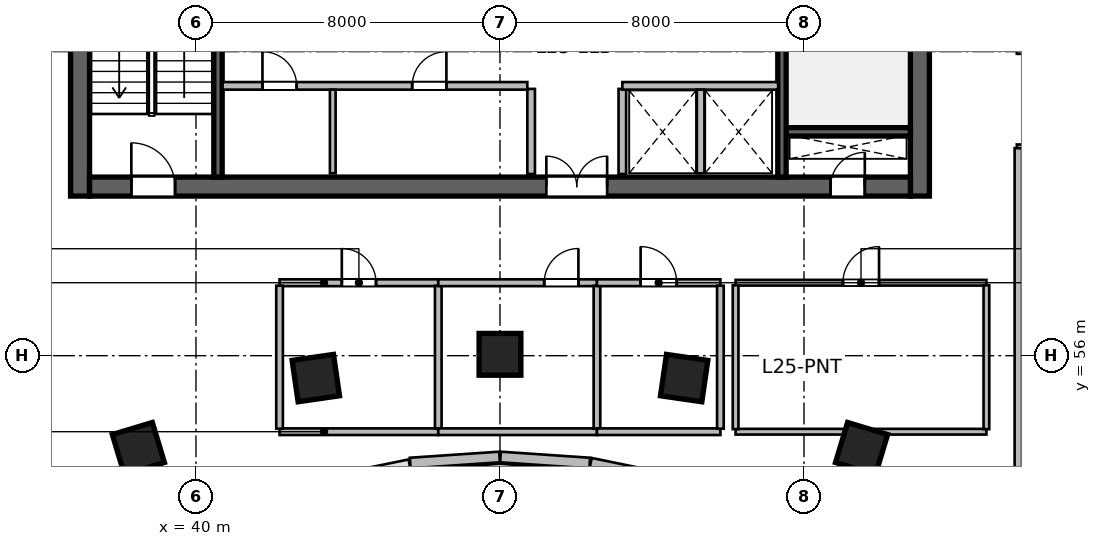
"""IFC4 building model, lengths in metres.
Left out: names, types, materials, properties, quantities, classifications, styles, units other than length and angle.
Written with IfcOpenShell. Run it as: python <this file> out.ifc"""

import sys

from ifc_helpers import new_model, si_unit, direction, frame, frame_2d, origin, origin_2d, place, context, subcontext, project, spatial, rectangle, extrude, source, transform, mapped, element, fill, save


model = new_model("IFC4")
c1 = context("Model", 3, precision=1e-05, world=origin(), true_north=direction((0.0, 1.0)))
c2 = subcontext(c1, "Body", "Model", "MODEL_VIEW")
j1 = project(units=[si_unit("LENGTHUNIT", "METRE"), si_unit("PLANEANGLEUNIT", "RADIAN")], contexts=[c1])
p1 = place(None, origin())
s1 = spatial("IfcSite", under=j1, at=p1, CompositionType="ELEMENT")
p2 = place(p1, origin())
s2 = spatial("IfcBuilding", under=s1, at=p2, CompositionType="ELEMENT")
p3 = place(p2, frame((0.0, 0.0, 107.7)))
s3 = spatial("IfcBuildingStorey", under=s2, at=p3, CompositionType="ELEMENT", Elevation=107.7)
m1 = source(origin(), c2, "Body", "SweptSolid", [
    extrude(rectangle(XDim=12.0, YDim=0.5, at=frame_2d((6.0, 0.0))), origin(), (0.0, 0.0, 1.0), 3.9),
])
for number, where, z_axis, x_axis in (
    (1, (36.95, 60.2, 0.0), (0.0, 0.0, 1.0), (0.0, 1.0, 0.0)),
    (2, (59.05, 60.2, 0.0), (0.0, 0.0, 1.0), (0.0, 1.0, 0.0)),
):
    element("IfcWall", number, at=place(p3, frame(where, z_axis=z_axis, x_axis=x_axis)), inside=s3, PredefinedType="SHEAR", context=c2, shape_type="MappedRepresentation", body=[
        mapped(m1, transform((0.0, 0.0, 0.0), scale=1.0)),
    ])
m2 = source(origin(), c2, "Body", "SweptSolid", [
    extrude(rectangle(XDim=21.6, YDim=0.5, at=frame_2d((10.8, 0.0))), origin(), (0.0, 0.0, 1.0), 3.9),
])
p4 = place(p3, frame((37.2, 60.45, 0.0), z_axis=(0.0, 0.0, 1.0), x_axis=(1.0, 0.0, 0.0)))
e3 = element("IfcWall", 3, at=p4, inside=s3, PredefinedType="SHEAR", context=c2, shape_type="MappedRepresentation", body=[
    mapped(m2, transform((0.0, 0.0, 0.0), scale=1.0)),
])
p5 = place(p4, frame((1.1, 0.0, 0.0)))
e4 = element("IfcOpeningElement", 4, at=p5, cuts=e3, PredefinedType="OPENING", context=c2, shape_type="SweptSolid", body=[
    extrude(rectangle(XDim=1.15, YDim=2.15, at=frame_2d((0.575, 1.075))), frame((0.0, 0.26, 0.0), z_axis=(0.0, -1.0, 0.0), x_axis=(1.0, 0.0, 0.0)), (0.0, 0.0, 1.0), 0.52),
])
p6 = place(p4, frame((19.5, 0.0, 0.0)))
e5 = element("IfcOpeningElement", 5, at=p6, cuts=e3, PredefinedType="OPENING", context=c2, shape_type="SweptSolid", body=[
    extrude(rectangle(XDim=0.9, YDim=2.1, at=frame_2d((0.45, 1.05))), frame((0.0, 0.26, 0.0), z_axis=(0.0, -1.0, 0.0), x_axis=(1.0, 0.0, 0.0)), (0.0, 0.0, 1.0), 0.52),
])
p7 = place(p4, frame((12.02, 0.0, 0.0)))
e6 = element("IfcOpeningElement", 6, at=p7, cuts=e3, PredefinedType="OPENING", context=c2, shape_type="SweptSolid", body=[
    extrude(rectangle(XDim=1.6, YDim=2.15, at=frame_2d((0.8, 1.075))), frame((0.0, 0.26, 0.0), z_axis=(0.0, -1.0, 0.0), x_axis=(1.0, 0.0, 0.0)), (0.0, 0.0, 1.0), 0.52),
])
m3 = source(origin(), c2, "Body", "SweptSolid", [
    extrude(rectangle(XDim=3.27, YDim=0.22, at=frame_2d((1.635, 0.0))), origin(), (0.0, 0.0, 1.0), 3.9),
])
p8 = place(p3, frame((55.53, 61.89, 0.0), z_axis=(0.0, 0.0, 1.0), x_axis=(1.0, 0.0, 0.0)))
e7 = element("IfcWall", 7, at=p8, inside=s3, PredefinedType="SHEAR", context=c2, shape_type="MappedRepresentation", body=[
    mapped(m3, transform((0.0, 0.0, 0.0), scale=1.0)),
])
m4 = source(origin(), c2, "Body", "SweptSolid", [
    extrude(rectangle(XDim=11.0, YDim=0.22, at=frame_2d((5.5, 0.0))), origin(), (0.0, 0.0, 1.0), 3.9),
])
p9 = place(p3, frame((40.58, 60.7, 0.0), z_axis=(0.0, 0.0, 1.0), x_axis=(0.0, 1.0, 0.0)))
e8 = element("IfcWall", 8, at=p9, inside=s3, PredefinedType="SHEAR", context=c2, shape_type="MappedRepresentation", body=[
    mapped(m4, transform((0.0, 0.0, 0.0), scale=1.0)),
])
p10 = place(p3, frame((55.42, 60.7, 0.0), z_axis=(0.0, 0.0, 1.0), x_axis=(0.0, 1.0, 0.0)))
e9 = element("IfcWall", 9, at=p10, inside=s3, PredefinedType="SHEAR", context=c2, shape_type="MappedRepresentation", body=[
    mapped(m4, transform((0.0, 0.0, 0.0), scale=1.0)),
])
p11 = place(p10, frame((9.545, 0.0, 0.0)))
e10 = element("IfcOpeningElement", 10, at=p11, cuts=e9, PredefinedType="OPENING", context=c2, shape_type="SweptSolid", body=[
    extrude(rectangle(XDim=1.15, YDim=2.15, at=frame_2d((0.575, 1.075))), frame((0.0, 0.12, 0.0), z_axis=(0.0, -1.0, 0.0), x_axis=(1.0, 0.0, 0.0)), (0.0, 0.0, 1.0), 0.24),
])
m5 = source(origin(), c2, "Body", "SweptSolid", [
    extrude(rectangle(XDim=1.1, YDim=1.1, at=origin_2d()), origin(), (0.0, 0.0, 1.0), 3.9),
])
for number, where, z_axis, x_axis in (
    (11, (38.485, 53.558, 0.0), (0.0, 0.0, 1.0), (-0.289, 0.957, 0.0)),
    (12, (43.154, 55.411, 0.0), (0.0, 0.0, 1.0), (-0.143, 0.99, 0.0)),
    (13, (48.0, 56.036, 0.0), (0.0, 0.0, 1.0), (0.0, 1.0, 0.0)),
    (14, (52.846, 55.411, 0.0), (0.0, 0.0, 1.0), (0.143, 0.99, 0.0)),
    (15, (57.515, 53.558, 0.0), (0.0, 0.0, 1.0), (0.289, 0.957, 0.0)),
):
    element("IfcColumn", number, at=place(p3, frame(where, z_axis=z_axis, x_axis=x_axis)), inside=s3, PredefinedType="COLUMN", context=c2, shape_type="MappedRepresentation", body=[
        mapped(m5, transform((0.0, 0.0, 0.0), scale=1.0)),
    ])
m6 = source(origin(), c2, "Body", "SweptSolid", [
    extrude(rectangle(XDim=2.374, YDim=0.28, at=frame_2d((1.187, 0.0))), origin(), (0.0, 0.0, 1.0), 3.65),
])
p12 = place(p3, frame((52.711, 52.695, 0.0), z_axis=(0.0, 0.0, 1.0), x_axis=(-0.979619827472, 0.200860632341, 0.0)))
e16 = element("IfcWall", 16, at=p12, inside=s3, PredefinedType="SOLIDWALL", context=c2, shape_type="MappedRepresentation", body=[
    mapped(m6, transform((0.0, 0.0, 0.0), scale=1.0)),
])
m7 = source(origin(), c2, "Body", "SweptSolid", [
    extrude(rectangle(XDim=2.355, YDim=0.28, at=frame_2d((1.177, 0.0))), origin(), (0.0, 0.0, 1.0), 3.65),
])
for number, where, z_axis, x_axis in (
    (17, (50.362, 53.175, 0.0), (0.0, 0.0, 1.0), (-0.998, 0.068, 0.0)),
    (18, (47.988, 53.335, 0.0), (0.0, 0.0, 1.0), (-0.998, -0.068, 0.0)),
):
    element("IfcWall", number, at=place(p3, frame(where, z_axis=z_axis, x_axis=x_axis)), inside=s3, PredefinedType="SOLIDWALL", context=c2, shape_type="MappedRepresentation", body=[
        mapped(m7, transform((0.0, 0.0, 0.0), scale=1.0)),
    ])
m8 = source(origin(), c2, "Body", "SweptSolid", [
    extrude(rectangle(XDim=2.24, YDim=0.2, at=frame_2d((1.12, 0.0))), origin(), (0.0, 0.0, 1.0), 3.65),
])
for number, where, z_axis, x_axis in (
    (19, (48.82, 60.78, 0.0), (0.0, 0.0, 1.0), (0.0, 1.0, 0.0)),
    (20, (51.22, 60.78, 0.0), (0.0, 0.0, 1.0), (0.0, 1.0, 0.0)),
):
    element("IfcWall", number, at=place(p3, frame(where, z_axis=z_axis, x_axis=x_axis)), inside=s3, PredefinedType="SOLIDWALL", context=c2, shape_type="MappedRepresentation", body=[
        mapped(m8, transform((0.0, 0.0, 0.0), scale=1.0)),
    ])
m9 = source(origin(), c2, "Body", "SweptSolid", [
    extrude(rectangle(XDim=8.02, YDim=0.2, at=frame_2d((4.01, 0.0))), origin(), (0.0, 0.0, 1.0), 3.65),
])
p13 = place(p3, frame((40.7, 63.1, 0.0), z_axis=(0.0, 0.0, 1.0), x_axis=(1.0, 0.0, 0.0)))
e21 = element("IfcWall", 21, at=p13, inside=s3, PredefinedType="SOLIDWALL", context=c2, shape_type="MappedRepresentation", body=[
    mapped(m9, transform((0.0, 0.0, 0.0), scale=1.0)),
])
p14 = place(p13, frame((1.05, 0.0, 0.0)))
e22 = element("IfcOpeningElement", 22, at=p14, cuts=e21, PredefinedType="OPENING", context=c2, shape_type="SweptSolid", body=[
    extrude(rectangle(XDim=0.9, YDim=2.1, at=frame_2d((0.45, 1.05))), frame((0.0, 0.11, 0.0), z_axis=(0.0, -1.0, 0.0), x_axis=(1.0, 0.0, 0.0)), (0.0, 0.0, 1.0), 0.22),
])
p15 = place(p13, frame((4.99, 0.0, 0.0)))
e23 = element("IfcOpeningElement", 23, at=p15, cuts=e21, PredefinedType="OPENING", context=c2, shape_type="SweptSolid", body=[
    extrude(rectangle(XDim=0.9, YDim=2.1, at=frame_2d((0.45, 1.05))), frame((0.0, 0.11, 0.0), z_axis=(0.0, -1.0, 0.0), x_axis=(1.0, 0.0, 0.0)), (0.0, 0.0, 1.0), 0.22),
])
m10 = source(origin(), c2, "Body", "SweptSolid", [
    extrude(rectangle(XDim=4.1, YDim=0.2, at=frame_2d((2.05, 0.0))), origin(), (0.0, 0.0, 1.0), 3.65),
])
p16 = place(p3, frame((51.22, 63.1, 0.0), z_axis=(0.0, 0.0, 1.0), x_axis=(1.0, 0.0, 0.0)))
e24 = element("IfcWall", 24, at=p16, inside=s3, PredefinedType="SOLIDWALL", context=c2, shape_type="MappedRepresentation", body=[
    mapped(m10, transform((0.0, 0.0, 0.0), scale=1.0)),
])
m11 = source(origin(), c2, "Body", "SweptSolid", [
    extrude(rectangle(XDim=2.2, YDim=0.15, at=frame_2d((1.1, 0.0))), origin(), (0.0, 0.0, 1.0), 3.65),
])
p17 = place(p3, frame((43.6, 60.8, 0.0), z_axis=(0.0, 0.0, 1.0), x_axis=(0.0, 1.0, 0.0)))
e25 = element("IfcWall", 25, at=p17, inside=s3, PredefinedType="PARTITIONING", context=c2, shape_type="MappedRepresentation", body=[
    mapped(m11, transform((0.0, 0.0, 0.0), scale=1.0)),
])
m12 = source(origin(), c2, "Body", "SweptSolid", [
    extrude(rectangle(XDim=2.2, YDim=0.2, at=frame_2d((1.1, 0.0))), origin(), (0.0, 0.0, 1.0), 3.65),
])
p18 = place(p3, frame((53.28, 60.8, 0.0), z_axis=(0.0, 0.0, 1.0), x_axis=(0.0, 1.0, 0.0)))
e26 = element("IfcWall", 26, at=p18, inside=s3, PredefinedType="SOLIDWALL", context=c2, shape_type="MappedRepresentation", body=[
    mapped(m12, transform((0.0, 0.0, 0.0), scale=1.0)),
])
m13 = source(origin(), c2, "Body", "SweptSolid", [
    extrude(rectangle(XDim=4.176, YDim=0.175, at=frame_2d((2.088, 0.0))), origin(), (0.0, 0.0, 1.0), 3.65),
])
p19 = place(p3, frame((42.2, 54.0, 0.0), z_axis=(0.0, 0.0, 1.0), x_axis=(1.0, 0.0, 0.0)))
e27 = element("IfcWall", 27, at=p19, inside=s3, PredefinedType="PARTITIONING", context=c2, shape_type="MappedRepresentation", body=[
    mapped(m13, transform((0.0, 0.0, 0.0), scale=1.0)),
])
m14 = source(origin(), c2, "Body", "SweptSolid", [
    extrude(rectangle(XDim=4.176, YDim=0.18, at=frame_2d((2.088, 0.0))), origin(), (0.0, 0.0, 1.0), 3.65),
])
p20 = place(p3, frame((42.2, 57.92, 0.0), z_axis=(0.0, 0.0, 1.0), x_axis=(1.0, 0.0, 0.0)))
e28 = element("IfcWall", 28, at=p20, inside=s3, PredefinedType="PLUMBINGWALL", context=c2, shape_type="MappedRepresentation", body=[
    mapped(m14, transform((0.0, 0.0, 0.0), scale=1.0)),
])
p21 = place(p20, frame((1.638, 0.0, 0.0)))
e29 = element("IfcOpeningElement", 29, at=p21, cuts=e28, PredefinedType="OPENING", context=c2, shape_type="SweptSolid", body=[
    extrude(rectangle(XDim=0.9, YDim=2.08, at=frame_2d((0.45, 1.04))), frame((0.0, 0.1, 0.0), z_axis=(0.0, -1.0, 0.0), x_axis=(1.0, 0.0, 0.0)), (0.0, 0.0, 1.0), 0.2),
])
m15 = source(origin(), c2, "Body", "SweptSolid", [
    extrude(rectangle(XDim=3.763, YDim=0.175, at=frame_2d((1.881, 0.0))), origin(), (0.0, 0.0, 1.0), 3.65),
])
for number, where, z_axis, x_axis in (
    (30, (42.2, 54.079, 0.0), (0.0, 0.0, 1.0), (0.0, 1.0, 0.0)),
    (31, (46.376, 54.079, 0.0), (0.0, 0.0, 1.0), (0.0, 1.0, 0.0)),
):
    element("IfcWall", number, at=place(p3, frame(where, z_axis=z_axis, x_axis=x_axis)), inside=s3, PredefinedType="PARTITIONING", context=c2, shape_type="MappedRepresentation", body=[
        mapped(m15, transform((0.0, 0.0, 0.0), scale=1.0)),
    ])
p22 = place(p3, frame((46.376, 54.0, 0.0), z_axis=(0.0, 0.0, 1.0), x_axis=(1.0, 0.0, 0.0)))
e32 = element("IfcWall", 32, at=p22, inside=s3, PredefinedType="PARTITIONING", context=c2, shape_type="MappedRepresentation", body=[
    mapped(m13, transform((0.0, 0.0, 0.0), scale=1.0)),
])
p23 = place(p3, frame((46.376, 57.92, 0.0), z_axis=(0.0, 0.0, 1.0), x_axis=(1.0, 0.0, 0.0)))
e33 = element("IfcWall", 33, at=p23, inside=s3, PredefinedType="PLUMBINGWALL", context=c2, shape_type="MappedRepresentation", body=[
    mapped(m14, transform((0.0, 0.0, 0.0), scale=1.0)),
])
p24 = place(p23, frame((2.788, 0.0, 0.0)))
e34 = element("IfcOpeningElement", 34, at=p24, cuts=e33, PredefinedType="OPENING", context=c2, shape_type="SweptSolid", body=[
    extrude(rectangle(XDim=0.9, YDim=2.08, at=frame_2d((0.45, 1.04))), frame((0.0, 0.1, 0.0), z_axis=(0.0, -1.0, 0.0), x_axis=(1.0, 0.0, 0.0)), (0.0, 0.0, 1.0), 0.2),
])
p25 = place(p3, frame((50.552, 54.079, 0.0), z_axis=(0.0, 0.0, 1.0), x_axis=(0.0, 1.0, 0.0)))
e35 = element("IfcWall", 35, at=p25, inside=s3, PredefinedType="PARTITIONING", context=c2, shape_type="MappedRepresentation", body=[
    mapped(m15, transform((0.0, 0.0, 0.0), scale=1.0)),
])
m16 = source(origin(), c2, "Body", "SweptSolid", [
    extrude(rectangle(XDim=3.248, YDim=0.175, at=frame_2d((1.624, 0.0))), origin(), (0.0, 0.0, 1.0), 3.65),
])
p26 = place(p3, frame((50.552, 54.0, 0.0), z_axis=(0.0, 0.0, 1.0), x_axis=(1.0, 0.0, 0.0)))
e36 = element("IfcWall", 36, at=p26, inside=s3, PredefinedType="PARTITIONING", context=c2, shape_type="MappedRepresentation", body=[
    mapped(m16, transform((0.0, 0.0, 0.0), scale=1.0)),
])
m17 = source(origin(), c2, "Body", "SweptSolid", [
    extrude(rectangle(XDim=3.248, YDim=0.18, at=frame_2d((1.624, 0.0))), origin(), (0.0, 0.0, 1.0), 3.65),
])
p27 = place(p3, frame((50.552, 57.92, 0.0), z_axis=(0.0, 0.0, 1.0), x_axis=(1.0, 0.0, 0.0)))
e37 = element("IfcWall", 37, at=p27, inside=s3, PredefinedType="PLUMBINGWALL", context=c2, shape_type="MappedRepresentation", body=[
    mapped(m17, transform((0.0, 0.0, 0.0), scale=1.0)),
])
p28 = place(p27, frame((1.149, 0.0, 0.0)))
e38 = element("IfcOpeningElement", 38, at=p28, cuts=e37, PredefinedType="OPENING", context=c2, shape_type="SweptSolid", body=[
    extrude(rectangle(XDim=0.95, YDim=2.12, at=frame_2d((0.475, 1.06))), frame((0.0, 0.1, 0.0), z_axis=(0.0, -1.0, 0.0), x_axis=(1.0, 0.0, 0.0)), (0.0, 0.0, 1.0), 0.2),
])
p29 = place(p3, frame((53.8, 54.079, 0.0), z_axis=(0.0, 0.0, 1.0), x_axis=(0.0, 1.0, 0.0)))
e39 = element("IfcWall", 39, at=p29, inside=s3, PredefinedType="PARTITIONING", context=c2, shape_type="MappedRepresentation", body=[
    mapped(m15, transform((0.0, 0.0, 0.0), scale=1.0)),
])
m18 = source(origin(), c2, "Body", "SweptSolid", [
    extrude(rectangle(XDim=6.6, YDim=0.15, at=frame_2d((3.3, 0.0))), origin(), (0.0, 0.0, 1.0), 3.095),
])
p30 = place(p3, frame((54.2, 54.0, 0.0), z_axis=(0.0, 0.0, 1.0), x_axis=(1.0, 0.0, 0.0)))
e40 = element("IfcWall", 40, at=p30, inside=s3, PredefinedType="PARTITIONING", context=c2, shape_type="MappedRepresentation", body=[
    mapped(m18, transform((0.0, 0.0, 0.0), scale=1.0)),
])
m19 = source(origin(), c2, "Body", "SweptSolid", [
    extrude(rectangle(XDim=6.6, YDim=0.15, at=frame_2d((3.3, 0.0))), origin(), (0.0, 0.0, 1.0), 3.65),
])
p31 = place(p3, frame((54.2, 57.92, 0.0), z_axis=(0.0, 0.0, 1.0), x_axis=(1.0, 0.0, 0.0)))
e41 = element("IfcWall", 41, at=p31, inside=s3, PredefinedType="PARTITIONING", context=c2, shape_type="MappedRepresentation", body=[
    mapped(m19, transform((0.0, 0.0, 0.0), scale=1.0)),
])
p32 = place(p31, frame((2.825, 0.0, 0.0)))
e42 = element("IfcOpeningElement", 42, at=p32, cuts=e41, PredefinedType="OPENING", context=c2, shape_type="SweptSolid", body=[
    extrude(rectangle(XDim=0.95, YDim=2.1, at=frame_2d((0.475, 1.05))), frame((0.0, 0.085, 0.0), z_axis=(0.0, -1.0, 0.0), x_axis=(1.0, 0.0, 0.0)), (0.0, 0.0, 1.0), 0.17),
])
m20 = source(origin(), c2, "Body", "SweptSolid", [
    extrude(rectangle(XDim=3.785, YDim=0.15, at=frame_2d((1.893, 0.0))), origin(), (0.0, 0.0, 1.0), 3.65),
])
for number, where, z_axis, x_axis in (
    (43, (54.2, 54.067, 0.0), (0.0, 0.0, 1.0), (0.0, 1.0, 0.0)),
    (44, (60.8, 54.067, 0.0), (0.0, 0.0, 1.0), (0.0, 1.0, 0.0)),
):
    element("IfcWall", number, at=place(p3, frame(where, z_axis=z_axis, x_axis=x_axis)), inside=s3, PredefinedType="PARTITIONING", context=c2, shape_type="MappedRepresentation", body=[
        mapped(m20, transform((0.0, 0.0, 0.0), scale=1.0)),
    ])
m21 = source(origin(), c2, "Body", "SweptSolid", [
    extrude(rectangle(XDim=6.9, YDim=0.195, at=frame_2d((3.45, 0.0))), origin(), (0.0, 0.0, 1.0), 3.65),
])
p33 = place(p3, frame((61.6, 64.04, 0.0), z_axis=(0.0, 0.0, 1.0), x_axis=(1.0, 0.0, 0.0)))
e45 = element("IfcWall", 45, at=p33, inside=s3, PredefinedType="PARTITIONING", context=c2, shape_type="MappedRepresentation", body=[
    mapped(m21, transform((0.0, 0.0, 0.0), scale=1.0)),
])
p34 = place(p33, frame((2.975, 0.0, 0.0)))
e46 = element("IfcOpeningElement", 46, at=p34, cuts=e45, PredefinedType="OPENING", context=c2, shape_type="SweptSolid", body=[
    extrude(rectangle(XDim=0.95, YDim=2.1, at=frame_2d((0.475, 1.05))), frame((0.0, 0.107, 0.0), z_axis=(0.0, -1.0, 0.0), x_axis=(1.0, 0.0, 0.0)), (0.0, 0.0, 1.0), 0.215),
])
p35 = place(p3, frame((61.6, 61.46, 0.0), z_axis=(0.0, 0.0, 1.0), x_axis=(1.0, 0.0, 0.0)))
e47 = element("IfcWall", 47, at=p35, inside=s3, PredefinedType="PARTITIONING", context=c2, shape_type="MappedRepresentation", body=[
    mapped(m21, transform((0.0, 0.0, 0.0), scale=1.0)),
])
p36 = place(p35, frame((2.975, 0.0, 0.0)))
e48 = element("IfcOpeningElement", 48, at=p36, cuts=e47, PredefinedType="OPENING", context=c2, shape_type="SweptSolid", body=[
    extrude(rectangle(XDim=0.95, YDim=2.1, at=frame_2d((0.475, 1.05))), frame((0.0, 0.107, 0.0), z_axis=(0.0, -1.0, 0.0), x_axis=(1.0, 0.0, 0.0)), (0.0, 0.0, 1.0), 0.215),
])
m22 = source(origin(), c2, "Body", "SweptSolid", [
    extrude(rectangle(XDim=13.988, YDim=0.195, at=frame_2d((6.994, 0.0))), origin(), (0.0, 0.0, 1.0), 2.942),
])
p37 = place(p3, frame((61.64, 47.472, 0.0), z_axis=(0.0, 0.0, 1.0), x_axis=(0.0, 1.0, 0.0)))
e49 = element("IfcWall", 49, at=p37, inside=s3, PredefinedType="PARTITIONING", context=c2, shape_type="MappedRepresentation", body=[
    mapped(m22, transform((0.0, 0.0, 0.0), scale=1.0)),
])
m23 = source(origin(), c2, "Body", "SweptSolid", [
    extrude(rectangle(XDim=1.15, YDim=2.15, at=frame_2d((0.575, 1.075))), frame((0.0, 0.025, 0.0), z_axis=(0.0, -1.0, 0.0), x_axis=(1.0, 0.0, 0.0)), (0.0, 0.0, 1.0), 0.05),
])
p38 = place(p5, origin())
e50 = element("IfcDoor", 50, at=p38, inside=s3, OperationType="SINGLE_SWING_LEFT", PredefinedType="DOOR", context=c2, shape_type="MappedRepresentation", body=[
    mapped(m23, transform((0.0, 0.0, 0.0), scale=1.0)),
])
fill(e4, e50)
m24 = source(origin(), c2, "Body", "SweptSolid", [
    extrude(rectangle(XDim=0.9, YDim=2.1, at=frame_2d((0.45, 1.05))), frame((0.0, 0.025, 0.0), z_axis=(0.0, -1.0, 0.0), x_axis=(1.0, 0.0, 0.0)), (0.0, 0.0, 1.0), 0.05),
])
p39 = place(p6, origin())
e51 = element("IfcDoor", 51, at=p39, inside=s3, OperationType="SINGLE_SWING_RIGHT", PredefinedType="DOOR", context=c2, shape_type="MappedRepresentation", body=[
    mapped(m24, transform((0.0, 0.0, 0.0), scale=1.0)),
])
fill(e5, e51)
m25 = source(origin(), c2, "Body", "SweptSolid", [
    extrude(rectangle(XDim=1.6, YDim=2.15, at=frame_2d((0.8, 1.075))), frame((0.0, 0.025, 0.0), z_axis=(0.0, -1.0, 0.0), x_axis=(1.0, 0.0, 0.0)), (0.0, 0.0, 1.0), 0.05),
])
p40 = place(p7, origin())
e52 = element("IfcDoor", 52, at=p40, inside=s3, OperationType="DOUBLE_DOOR_SINGLE_SWING", PredefinedType="DOOR", context=c2, shape_type="MappedRepresentation", body=[
    mapped(m25, transform((0.0, 0.0, 0.0), scale=1.0)),
])
fill(e6, e52)
p41 = place(p14, origin())
e53 = element("IfcDoor", 53, at=p41, inside=s3, OperationType="SINGLE_SWING_LEFT", PredefinedType="DOOR", context=c2, shape_type="MappedRepresentation", body=[
    mapped(m24, transform((0.0, 0.0, 0.0), scale=1.0)),
])
fill(e22, e53)
p42 = place(p15, origin())
e54 = element("IfcDoor", 54, at=p42, inside=s3, OperationType="SINGLE_SWING_RIGHT", PredefinedType="DOOR", context=c2, shape_type="MappedRepresentation", body=[
    mapped(m24, transform((0.0, 0.0, 0.0), scale=1.0)),
])
fill(e23, e54)
m26 = source(origin(), c2, "Body", "SweptSolid", [
    extrude(rectangle(XDim=0.9, YDim=2.08, at=frame_2d((0.45, 1.04))), frame((0.0, 0.025, 0.0), z_axis=(0.0, -1.0, 0.0), x_axis=(1.0, 0.0, 0.0)), (0.0, 0.0, 1.0), 0.05),
])
p43 = place(p21, origin())
e55 = element("IfcDoor", 55, at=p43, inside=s3, OperationType="SINGLE_SWING_LEFT", PredefinedType="DOOR", context=c2, shape_type="MappedRepresentation", body=[
    mapped(m26, transform((0.0, 0.0, 0.0), scale=1.0)),
])
fill(e29, e55)
p44 = place(p24, origin())
e56 = element("IfcDoor", 56, at=p44, inside=s3, OperationType="SINGLE_SWING_RIGHT", PredefinedType="DOOR", context=c2, shape_type="MappedRepresentation", body=[
    mapped(m26, transform((0.0, 0.0, 0.0), scale=1.0)),
])
fill(e34, e56)
m27 = source(origin(), c2, "Body", "SweptSolid", [
    extrude(rectangle(XDim=0.95, YDim=2.12, at=frame_2d((0.475, 1.06))), frame((0.0, 0.025, 0.0), z_axis=(0.0, -1.0, 0.0), x_axis=(1.0, 0.0, 0.0)), (0.0, 0.0, 1.0), 0.05),
])
p45 = place(p28, origin())
e57 = element("IfcDoor", 57, at=p45, inside=s3, OperationType="SINGLE_SWING_LEFT", PredefinedType="DOOR", context=c2, shape_type="MappedRepresentation", body=[
    mapped(m27, transform((0.0, 0.0, 0.0), scale=1.0)),
])
fill(e38, e57)
m28 = source(origin(), c2, "Body", "SweptSolid", [
    extrude(rectangle(XDim=0.95, YDim=2.1, at=frame_2d((0.475, 1.05))), frame((0.0, 0.025, 0.0), z_axis=(0.0, -1.0, 0.0), x_axis=(1.0, 0.0, 0.0)), (0.0, 0.0, 1.0), 0.05),
])
p46 = place(p32, origin())
e58 = element("IfcDoor", 58, at=p46, inside=s3, OperationType="SINGLE_SWING_RIGHT", PredefinedType="DOOR", context=c2, shape_type="MappedRepresentation", body=[
    mapped(m28, transform((0.0, 0.0, 0.0), scale=1.0)),
])
fill(e42, e58)
save(model, sys.argv[1])
